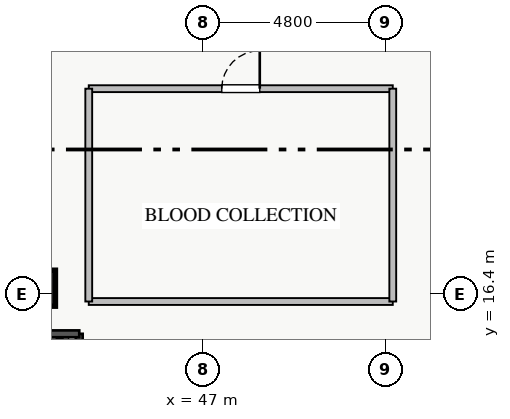
"""IFC4 building model, lengths in metres.
Left out: names, types, materials, properties, quantities, classifications, styles, units other than length and angle.
Written with IfcOpenShell. Run it as: python <this file> out.ifc"""

import sys

from ifc_helpers import new_model, si_unit, direction, frame, frame_2d, origin, origin_2d, place, context, subcontext, project, spatial, rectangle, extrude, source, transform, mapped, element, fill, save


model = new_model("IFC4")
c1 = context("Model", 3, precision=1e-05, world=origin(), true_north=direction((0.0, 1.0)))
c2 = subcontext(c1, "Body", "Model", "MODEL_VIEW")
j1 = project(units=[si_unit("LENGTHUNIT", "METRE"), si_unit("PLANEANGLEUNIT", "RADIAN")], contexts=[c1])
p1 = place(None, origin())
s1 = spatial("IfcSite", under=j1, at=p1, CompositionType="ELEMENT")
p2 = place(p1, origin())
s2 = spatial("IfcBuilding", under=s1, at=p2, CompositionType="ELEMENT")
p3 = place(p2, origin())
s3 = spatial("IfcBuildingStorey", under=s2, at=p3, CompositionType="ELEMENT", Elevation=0.0)
p4 = place(p3, frame((43.75, 12.65, 0.0), z_axis=(0.0, 0.0, 1.0), x_axis=(0.0, 1.0, 0.0)))
e1 = element("IfcWall", 1, at=p4, inside=s3, PredefinedType="SHEAR", context=c2, shape_type="SweptSolid", body=[
    extrude(rectangle(XDim=2.7, YDim=0.18, at=frame_2d((1.35, 0.0))), origin(), (0.0, 0.0, 1.0), 4.78),
])
p5 = place(p3, frame((41.55, 15.35, 0.0), z_axis=(0.0, 0.0, 1.0), x_axis=(1.0, 0.0, 0.0)))
e2 = element("IfcWall", 2, at=p5, inside=s3, PredefinedType="SHEAR", context=c2, shape_type="SweptSolid", body=[
    extrude(rectangle(XDim=2.2, YDim=0.18, at=frame_2d((1.1, 0.0))), origin(), (0.0, 0.0, 1.0), 4.78),
])
m1 = source(origin(), c2, "Body", "SweptSolid", [
    extrude(rectangle(XDim=0.95, YDim=0.95, at=origin_2d()), origin(), (0.0, 0.0, 1.0), 5.0),
])
p6 = place(p3, frame((42.65, 16.55, 0.0), z_axis=(0.0, 0.0, 1.0), x_axis=(1.0, 0.0, 0.0)))
e3 = element("IfcColumn", 3, at=p6, inside=s3, PredefinedType="COLUMN", context=c2, shape_type="MappedRepresentation", body=[
    mapped(m1, transform((0.0, 0.0, 0.0), x_axis=(1.0, 0.0, 0.0), y_axis=(0.0, 1.0, 0.0), z_axis=(0.0, 0.0, 1.0), scale=1.0)),
])
p7 = place(p3, frame((44.0, 16.2, 0.0), z_axis=(0.0, 0.0, 1.0), x_axis=(1.0, 0.0, 0.0)))
e4 = element("IfcWall", 4, at=p7, inside=s3, PredefinedType="PARTITIONING", context=c2, shape_type="SweptSolid", body=[
    extrude(rectangle(XDim=8.0, YDim=0.18, at=frame_2d((4.0, 0.0))), origin(), (0.0, 0.0, 1.0), 4.78),
])
p8 = place(p3, frame((44.0, 21.8, 0.0), z_axis=(0.0, 0.0, 1.0), x_axis=(1.0, 0.0, 0.0)))
e5 = element("IfcWall", 5, at=p8, inside=s3, PredefinedType="PARTITIONING", context=c2, shape_type="SweptSolid", body=[
    extrude(rectangle(XDim=8.0, YDim=0.18, at=frame_2d((4.0, 0.0))), origin(), (0.0, 0.0, 1.0), 4.78),
])
p9 = place(p8, frame((3.5, 0.0, 0.0)))
e6 = element("IfcOpeningElement", 6, at=p9, cuts=e5, PredefinedType="OPENING", context=c2, shape_type="SweptSolid", body=[
    extrude(rectangle(XDim=1.0, YDim=2.05, at=frame_2d((0.5, 1.025))), frame((0.0, 0.1, 0.0), z_axis=(0.0, -1.0, 0.0), x_axis=(1.0, 0.0, 0.0)), (0.0, 0.0, 1.0), 0.2),
])
for number, where, z_axis, x_axis in (
    (7, (44.0, 16.2, 0.0), (0.0, 0.0, 1.0), (0.0, 1.0, 0.0)),
    (8, (52.0, 16.2, 0.0), (0.0, 0.0, 1.0), (0.0, 1.0, 0.0)),
):
    element("IfcWall", number, at=place(p3, frame(where, z_axis=z_axis, x_axis=x_axis)), inside=s3, PredefinedType="PARTITIONING", context=c2, shape_type="SweptSolid", body=[
        extrude(rectangle(XDim=5.6, YDim=0.18, at=frame_2d((2.8, 0.0))), origin(), (0.0, 0.0, 1.0), 4.78),
    ])
m2 = source(origin(), c2, "Body", "SweptSolid", [
    extrude(rectangle(XDim=1.0, YDim=2.05, at=frame_2d((0.5, 1.025))), frame((0.0, 0.025, 0.0), z_axis=(0.0, -1.0, 0.0), x_axis=(1.0, 0.0, 0.0)), (0.0, 0.0, 1.0), 0.05),
])
p10 = place(p9, origin())
e9 = element("IfcDoor", 9, at=p10, inside=s3, OperationType="SINGLE_SWING_RIGHT", PredefinedType="DOOR", context=c2, shape_type="MappedRepresentation", body=[
    mapped(m2, transform((0.0, 0.0, 0.0), x_axis=(1.0, 0.0, 0.0), y_axis=(0.0, 1.0, 0.0), z_axis=(0.0, 0.0, 1.0), scale=1.0)),
])
fill(e6, e9)
save(model, sys.argv[1])
